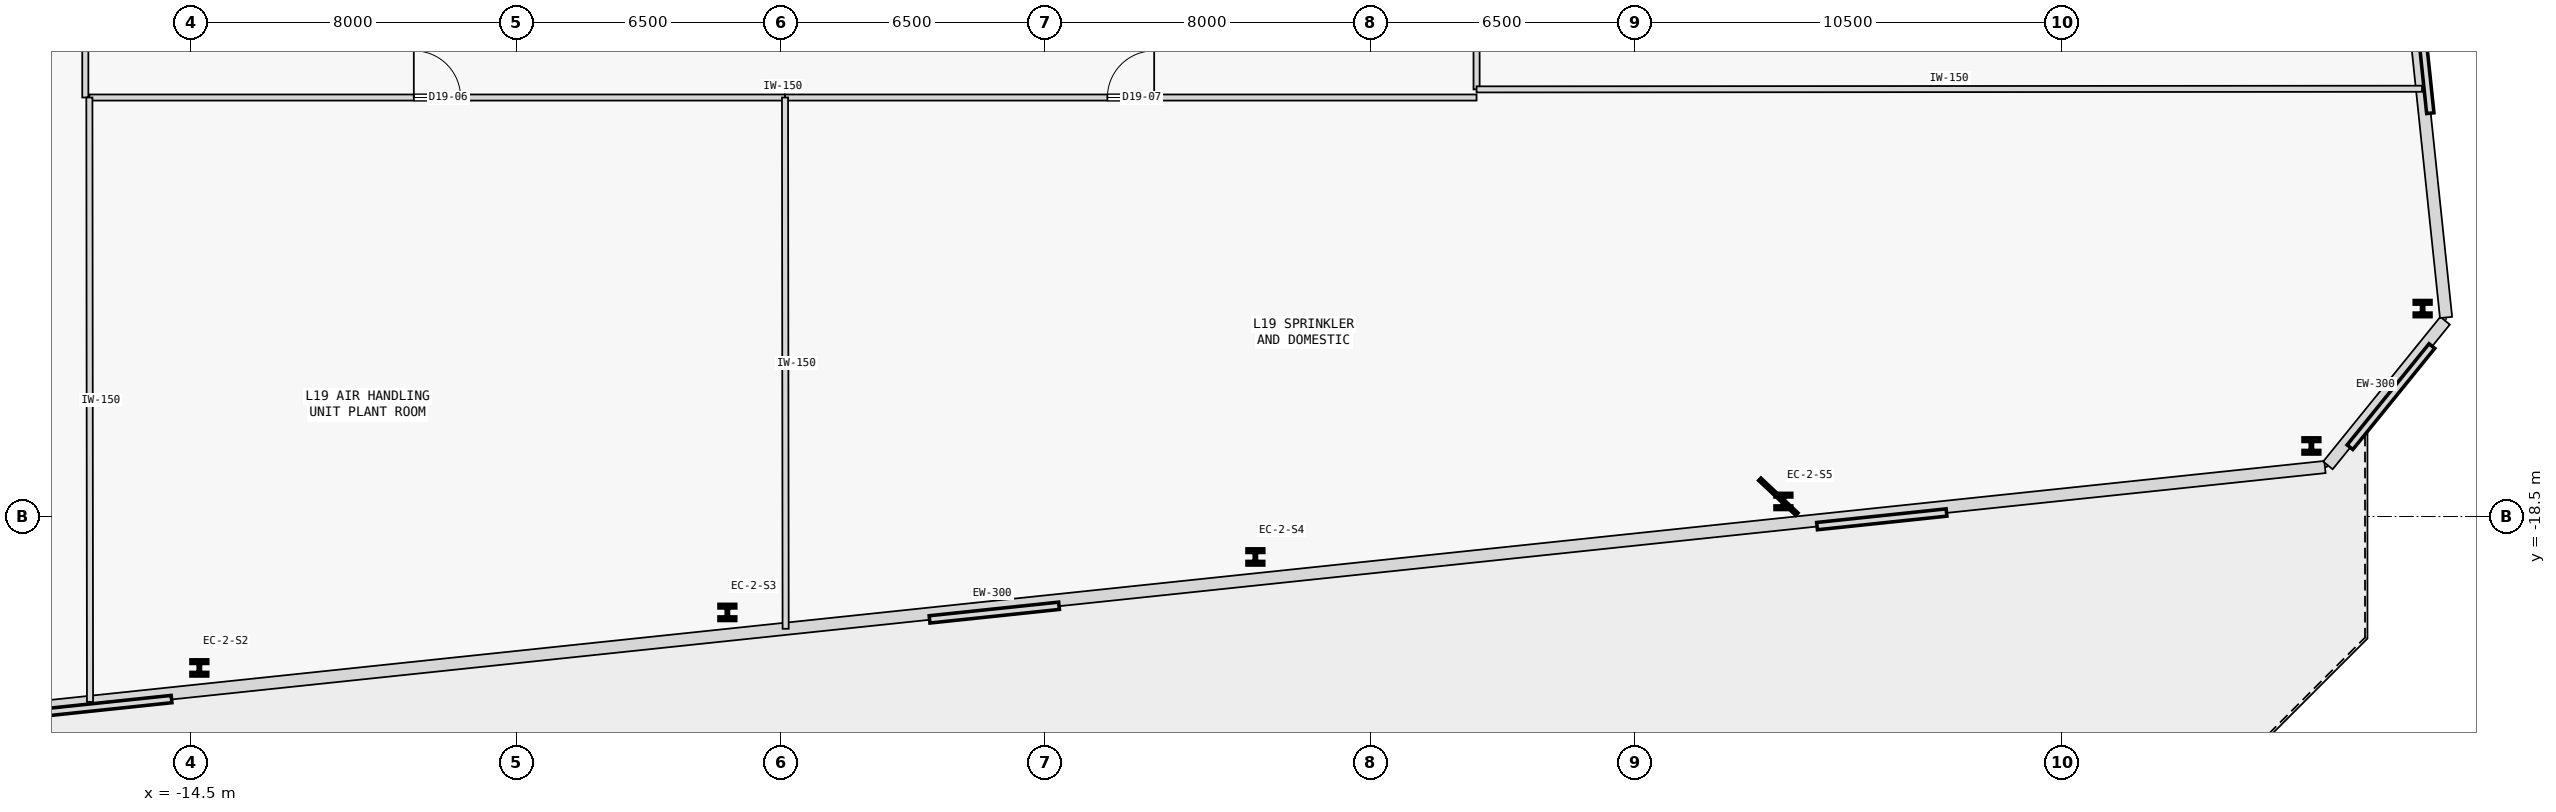
"""IFC4 building model, lengths in metres.
Left out: names, types, materials, properties, quantities, classifications, styles, units other than length and angle.
Written with IfcOpenShell. Run it as: python <this file> out.ifc"""

import sys

from ifc_helpers import new_model, si_unit, direction, frame, frame_2d, origin, origin_2d, place, context, subcontext, project, spatial, rectangle, i_section, extrude, element, fill, save


model = new_model("IFC4")
c1 = context("Model", 3, precision=1e-05, world=origin(), true_north=direction((0.0, 1.0)))
c2 = subcontext(c1, "Body", "Model", "MODEL_VIEW")
j1 = project(units=[si_unit("LENGTHUNIT", "METRE"), si_unit("PLANEANGLEUNIT", "RADIAN")], contexts=[c1])
p1 = place(None, origin())
s1 = spatial("IfcSite", under=j1, at=p1, CompositionType="ELEMENT")
p2 = place(p1, origin())
s2 = spatial("IfcBuilding", under=s1, at=p2, CompositionType="ELEMENT")
p3 = place(p2, frame((0.0, 0.0, 78.8)))
s3 = spatial("IfcBuildingStorey", under=s2, at=p3, CompositionType="ELEMENT", Elevation=78.8)
for number, where, z_axis, x_axis in (
    (1, (-14.297, -22.222, 0.0), (0.0, 0.0, 1.0), (1.0, 0.0, 0.0)),
    (2, (-1.317, -20.858, 0.0), (0.0, 0.0, 1.0), (1.0, 0.0, 0.0)),
    (3, (11.663, -19.494, 0.0), (0.0, 0.0, 1.0), (1.0, 0.0, 0.0)),
    (4, (24.642, -18.129, 0.0), (0.0, 0.0, 1.0), (1.0, 0.0, 0.0)),
    (5, (37.622, -16.765, 0.0), (0.0, 0.0, 1.0), (1.0, 0.0, 0.0)),
    (6, (40.356, -13.389, 0.0), (0.0, 0.0, 1.0), (1.0, 0.0, 0.0)),
):
    element("IfcColumn", number, at=place(p3, frame(where, z_axis=z_axis, x_axis=x_axis)), inside=s3, PredefinedType="COLUMN", context=c2, shape_type="SweptSolid", body=[
        extrude(i_section(OverallWidth=0.413, OverallDepth=0.398, WebThickness=0.056, FlangeThickness=0.089, FilletRadius=0.015, at=origin_2d()), origin(), (0.0, 0.0, 1.0), 4.4),
    ])
p4 = place(p3, frame((-27.494, -24.162, 0.0), z_axis=(0.0, 0.0, 1.0), x_axis=(0.99452206833, 0.104526817631, 0.0)))
e7 = element("IfcWall", 7, at=p4, inside=s3, PredefinedType="STANDARD", context=c2, shape_type="SweptSolid", body=[
    extrude(rectangle(XDim=65.81, YDim=0.3, at=frame_2d((32.905, 0.0))), origin(), (0.0, 0.0, 1.0), 4.15),
])
p5 = place(p3, frame((38.028, -17.243, 0.0), z_axis=(0.0, 0.0, 1.0), x_axis=(0.629328651904, 0.777139271876, 0.0)))
e8 = element("IfcWall", 8, at=p5, inside=s3, PredefinedType="STANDARD", context=c2, shape_type="SweptSolid", body=[
    extrude(rectangle(XDim=4.577, YDim=0.3, at=frame_2d((2.289, 0.0))), origin(), (0.0, 0.0, 1.0), 4.15),
])
p6 = place(p3, frame((40.932, -13.607, 0.0), z_axis=(0.0, 0.0, 1.0), x_axis=(-0.104531231484, 0.994521604413, 0.0)))
e9 = element("IfcWall", 9, at=p6, inside=s3, PredefinedType="STANDARD", context=c2, shape_type="SweptSolid", body=[
    extrude(rectangle(XDim=39.81, YDim=0.3, at=frame_2d((19.905, 0.0))), origin(), (0.0, 0.0, 1.0), 4.15),
])
p7 = place(p3, frame((-17.0, -8.2, 0.0), z_axis=(0.0, 0.0, 1.0), x_axis=(1.0, 0.0, 0.0)))
e10 = element("IfcWall", 10, at=p7, inside=s3, PredefinedType="PARTITIONING", context=c2, shape_type="SweptSolid", body=[
    extrude(rectangle(XDim=17.1, YDim=0.15, at=frame_2d((8.55, 0.0))), origin(), (0.0, 0.0, 1.0), 4.15),
])
p8 = place(p7, frame((7.975, 0.0, 0.0)))
e11 = element("IfcOpeningElement", 11, at=p8, cuts=e10, PredefinedType="OPENING", context=c2, shape_type="SweptSolid", body=[
    extrude(rectangle(XDim=1.15, YDim=2.15, at=frame_2d((0.575, 1.075))), frame((0.0, 0.085, 0.0), z_axis=(0.0, -1.0, 0.0), x_axis=(1.0, 0.0, 0.0)), (0.0, 0.0, 1.0), 0.17),
])
p9 = place(p3, frame((0.1, -8.2, 0.0), z_axis=(0.0, 0.0, 1.0), x_axis=(1.0, 0.0, 0.0)))
e12 = element("IfcWall", 12, at=p9, inside=s3, PredefinedType="PARTITIONING", context=c2, shape_type="SweptSolid", body=[
    extrude(rectangle(XDim=17.0, YDim=0.15, at=frame_2d((8.5, 0.0))), origin(), (0.0, 0.0, 1.0), 4.15),
])
p10 = place(p9, frame((7.925, 0.0, 0.0)))
e13 = element("IfcOpeningElement", 13, at=p10, cuts=e12, PredefinedType="OPENING", context=c2, shape_type="SweptSolid", body=[
    extrude(rectangle(XDim=1.15, YDim=2.15, at=frame_2d((0.575, 1.075))), frame((0.0, 0.085, 0.0), z_axis=(0.0, -1.0, 0.0), x_axis=(1.0, 0.0, 0.0)), (0.0, 0.0, 1.0), 0.17),
])
p11 = place(p3, frame((-17.1, -8.2, 0.0), z_axis=(0.0, 0.0, 1.0), x_axis=(0.0, 1.0, 0.0)))
e14 = element("IfcWall", 14, at=p11, inside=s3, PredefinedType="PARTITIONING", context=c2, shape_type="SweptSolid", body=[
    extrude(rectangle(XDim=16.4, YDim=0.15, at=frame_2d((8.2, 0.0))), origin(), (0.0, 0.0, 1.0), 4.15),
])
p12 = place(p11, frame((5.165, 0.0, 0.0)))
e15 = element("IfcOpeningElement", 15, at=p12, cuts=e14, PredefinedType="OPENING", context=c2, shape_type="SweptSolid", body=[
    extrude(rectangle(XDim=1.15, YDim=2.15, at=frame_2d((0.575, 1.075))), frame((0.0, 0.085, 0.0), z_axis=(0.0, -1.0, 0.0), x_axis=(1.0, 0.0, 0.0)), (0.0, 0.0, 1.0), 0.17),
])
p13 = place(p3, frame((17.1, -8.0, 0.0), z_axis=(0.0, 0.0, 1.0), x_axis=(0.0, 1.0, 0.0)))
e16 = element("IfcWall", 16, at=p13, inside=s3, PredefinedType="PARTITIONING", context=c2, shape_type="SweptSolid", body=[
    extrude(rectangle(XDim=16.0, YDim=0.15, at=frame_2d((8.0, 0.0))), origin(), (0.0, 0.0, 1.0), 4.15),
])
p14 = place(p13, frame((5.025, 0.0, 0.0)))
e17 = element("IfcOpeningElement", 17, at=p14, cuts=e16, PredefinedType="OPENING", context=c2, shape_type="SweptSolid", body=[
    extrude(rectangle(XDim=1.15, YDim=2.15, at=frame_2d((0.575, 1.075))), frame((0.0, 0.085, 0.0), z_axis=(0.0, -1.0, 0.0), x_axis=(1.0, 0.0, 0.0)), (0.0, 0.0, 1.0), 0.17),
])
p15 = place(p3, frame((0.116, -21.26, 0.0), z_axis=(0.0, 0.0, 1.0), x_axis=(-0.001196372637, 0.999999284346, 0.0)))
e18 = element("IfcWall", 18, at=p15, inside=s3, PredefinedType="PARTITIONING", context=c2, shape_type="SweptSolid", body=[
    extrude(rectangle(XDim=13.06, YDim=0.15, at=frame_2d((6.53, 0.0))), origin(), (0.0, 0.0, 1.0), 4.15),
])
p16 = place(p3, frame((-16.984, -23.058, 0.0), z_axis=(0.0, 0.0, 1.0), x_axis=(-0.00105164508, 0.999999447021, 0.0)))
e19 = element("IfcWall", 19, at=p16, inside=s3, PredefinedType="PARTITIONING", context=c2, shape_type="SweptSolid", body=[
    extrude(rectangle(XDim=14.858, YDim=0.15, at=frame_2d((7.429, 0.0))), origin(), (0.0, 0.0, 1.0), 4.15),
])
p17 = place(p3, frame((17.1, -8.0, 0.0), z_axis=(0.0, 0.0, 1.0), x_axis=(0.999999774004, 0.000672304066, 0.0)))
e20 = element("IfcWall", 20, at=p17, inside=s3, PredefinedType="PARTITIONING", context=c2, shape_type="SweptSolid", body=[
    extrude(rectangle(XDim=23.241, YDim=0.15, at=frame_2d((11.621, 0.0))), origin(), (0.0, 0.0, 1.0), 4.15),
])
p18 = place(p8, origin())
e21 = element("IfcDoor", 21, at=p18, inside=s3, OperationType="SINGLE_SWING_LEFT", PredefinedType="DOOR", context=c2, shape_type="SweptSolid", body=[
    extrude(rectangle(XDim=1.15, YDim=2.15, at=frame_2d((0.575, 1.075))), frame((0.0, 0.025, 0.0), z_axis=(0.0, -1.0, 0.0), x_axis=(1.0, 0.0, 0.0)), (0.0, 0.0, 1.0), 0.05),
])
fill(e11, e21)
p19 = place(p10, origin())
e22 = element("IfcDoor", 22, at=p19, inside=s3, OperationType="SINGLE_SWING_RIGHT", PredefinedType="DOOR", context=c2, shape_type="SweptSolid", body=[
    extrude(rectangle(XDim=1.15, YDim=2.15, at=frame_2d((0.575, 1.075))), frame((0.0, 0.025, 0.0), z_axis=(0.0, -1.0, 0.0), x_axis=(1.0, 0.0, 0.0)), (0.0, 0.0, 1.0), 0.05),
])
fill(e13, e22)
save(model, sys.argv[1])
